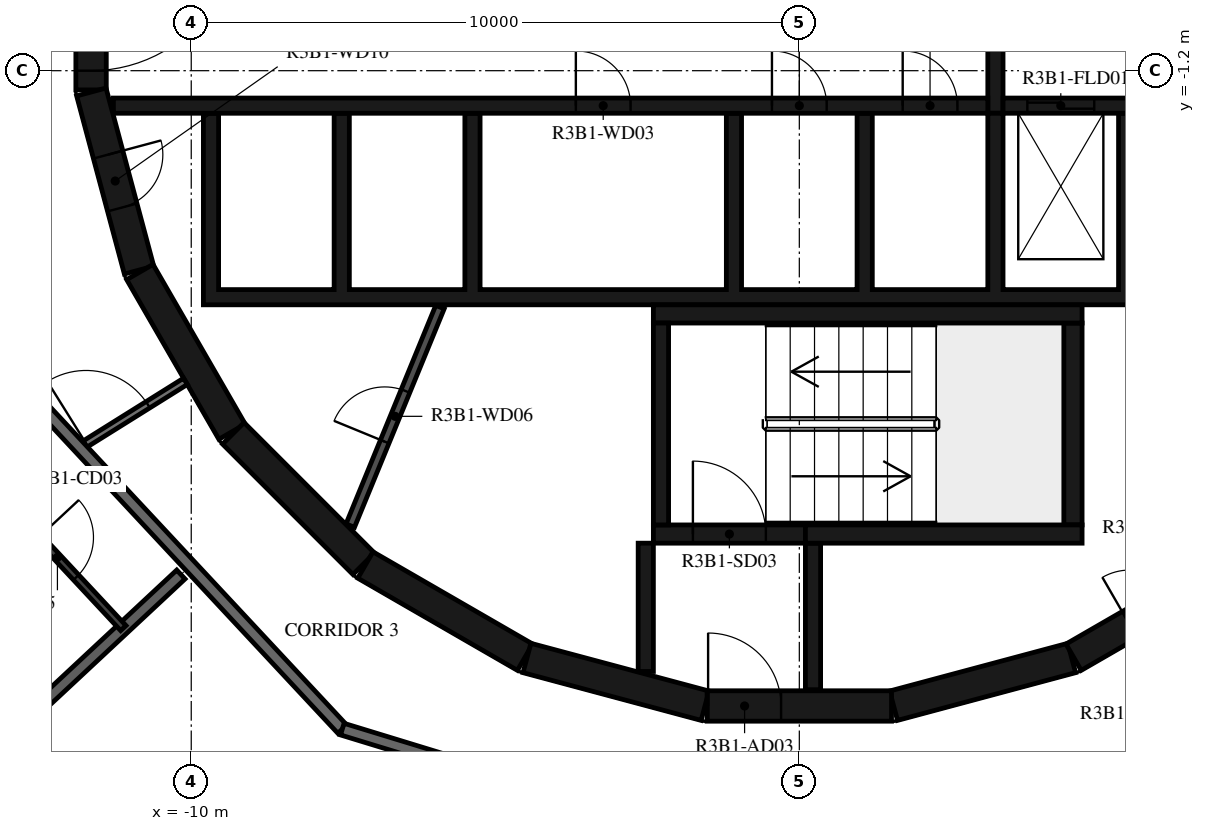
"""IFC4 building model, lengths in metres.
Left out: names, types, materials, properties, quantities, classifications, styles, units other than length and angle.
Written with IfcOpenShell. Run it as: python <this file> out.ifc"""

import sys

from ifc_helpers import new_model, si_unit, direction, frame, frame_2d, origin, place, context, subcontext, project, spatial, polyline, rectangle, outline, extrude, element, fill, save


model = new_model("IFC4")
c1 = context("Model", 3, precision=1e-05, world=origin(), true_north=direction((0.0, 1.0)))
c2 = subcontext(c1, "Body", "Model", "MODEL_VIEW")
j1 = project(units=[si_unit("LENGTHUNIT", "METRE"), si_unit("PLANEANGLEUNIT", "RADIAN")], contexts=[c1])
p1 = place(None, origin())
s1 = spatial("IfcSite", under=j1, at=p1, CompositionType="ELEMENT")
p2 = place(p1, origin())
s2 = spatial("IfcBuilding", under=s1, at=p2, CompositionType="ELEMENT")
p3 = place(p2, frame((0.0, 0.0, 123.9)))
s3 = spatial("IfcBuildingStorey", under=s2, at=p3, CompositionType="ELEMENT", Elevation=123.9)
p4 = place(p3, frame((1.55, -11.643, 0.0), z_axis=(0.0, 0.0, 1.0), x_axis=(0.965948410781, 0.258734743916, 0.0)))
e1 = element("IfcWall", 1, at=p4, inside=s3, PredefinedType="SHEAR", context=c2, shape_type="SweptSolid", body=[
    extrude(rectangle(XDim=3.033, YDim=0.5, at=frame_2d((1.516, 0.0))), origin(), (0.0, 0.0, 1.0), 3.12),
])
p5 = place(p3, frame((4.51, -10.845, 0.0), z_axis=(0.0, 0.0, 1.0), x_axis=(0.865975092491, 0.500087131594, 0.0)))
e2 = element("IfcWall", 2, at=p5, inside=s3, PredefinedType="SHEAR", context=c2, shape_type="SweptSolid", body=[
    extrude(rectangle(XDim=3.033, YDim=0.5, at=frame_2d((1.516, 0.0))), origin(), (0.0, 0.0, 1.0), 3.12),
])
p6 = place(p5, frame((1.066, 0.0, 0.0)))
e3 = element("IfcOpeningElement", 3, at=p6, cuts=e2, PredefinedType="OPENING", context=c2, shape_type="SweptSolid", body=[
    extrude(rectangle(XDim=0.9, YDim=2.1, at=frame_2d((0.45, 1.05))), frame((0.0, 0.26, 0.0), z_axis=(0.0, -1.0, 0.0), x_axis=(1.0, 0.0, 0.0)), (0.0, 0.0, 1.0), 0.52),
])
p7 = place(p3, frame((-11.647, 1.516, 0.0), z_axis=(0.0, 0.0, 1.0), x_axis=(0.0, -1.0, 0.0)))
e4 = element("IfcWall", 4, at=p7, inside=s3, PredefinedType="SHEAR", context=c2, shape_type="SweptSolid", body=[
    extrude(rectangle(XDim=3.033, YDim=0.5, at=frame_2d((1.516, 0.0))), origin(), (0.0, 0.0, 1.0), 3.12),
])
p8 = place(p7, frame((0.316, 0.0, 0.0)))
e5 = element("IfcOpeningElement", 5, at=p8, cuts=e4, PredefinedType="OPENING", context=c2, shape_type="SweptSolid", body=[
    extrude(rectangle(XDim=2.4, YDim=2.1, at=frame_2d((1.2, 1.05))), frame((0.0, 0.26, 0.0), z_axis=(0.0, -1.0, 0.0), x_axis=(1.0, 0.0, 0.0)), (0.0, 0.0, 1.0), 0.52),
])
p9 = place(p3, frame((-11.643, -1.55, 0.0), z_axis=(0.0, 0.0, 1.0), x_axis=(0.258734743916, -0.965948410781, 0.0)))
e6 = element("IfcWall", 6, at=p9, inside=s3, PredefinedType="SHEAR", context=c2, shape_type="SweptSolid", body=[
    extrude(rectangle(XDim=3.033, YDim=0.5, at=frame_2d((1.516, 0.0))), origin(), (0.0, 0.0, 1.0), 3.12),
])
p10 = place(p9, frame((1.066, 0.0, 0.0)))
e7 = element("IfcOpeningElement", 7, at=p10, cuts=e6, PredefinedType="OPENING", context=c2, shape_type="SweptSolid", body=[
    extrude(rectangle(XDim=0.9, YDim=2.1, at=frame_2d((0.45, 1.05))), frame((0.0, 0.26, 0.0), z_axis=(0.0, -1.0, 0.0), x_axis=(1.0, 0.0, 0.0)), (0.0, 0.0, 1.0), 0.52),
])
p11 = place(p3, frame((-10.845, -4.51, 0.0), z_axis=(0.0, 0.0, 1.0), x_axis=(0.500087131594, -0.865975092491, 0.0)))
e8 = element("IfcWall", 8, at=p11, inside=s3, PredefinedType="SHEAR", context=c2, shape_type="SweptSolid", body=[
    extrude(rectangle(XDim=3.033, YDim=0.5, at=frame_2d((1.516, 0.0))), origin(), (0.0, 0.0, 1.0), 3.12),
])
p12 = place(p3, frame((-9.308, -7.164, 0.0), z_axis=(0.0, 0.0, 1.0), x_axis=(0.707106781187, -0.707106781187, 0.0)))
e9 = element("IfcWall", 9, at=p12, inside=s3, PredefinedType="SHEAR", context=c2, shape_type="SweptSolid", body=[
    extrude(rectangle(XDim=3.032, YDim=0.5, at=frame_2d((1.516, 0.0))), origin(), (0.0, 0.0, 1.0), 3.12),
])
for number, where, z_axis, x_axis in (
    (10, (-7.137, -9.329, 0.0), (0.0, 0.0, 1.0), (0.866, -0.5, 0.0)),
    (11, (-4.479, -10.858, 0.0), (0.0, 0.0, 1.0), (0.966, -0.259, 0.0)),
):
    element("IfcWall", number, at=place(p3, frame(where, z_axis=z_axis, x_axis=x_axis)), inside=s3, PredefinedType="SHEAR", context=c2, shape_type="SweptSolid", body=[
        extrude(rectangle(XDim=3.033, YDim=0.5, at=frame_2d((1.516, 0.0))), origin(), (0.0, 0.0, 1.0), 3.12),
    ])
p13 = place(p3, frame((-1.516, -11.647, 0.0), z_axis=(0.0, 0.0, 1.0), x_axis=(1.0, 0.0, 0.0)))
e12 = element("IfcWall", 12, at=p13, inside=s3, PredefinedType="SHEAR", context=c2, shape_type="SweptSolid", body=[
    extrude(rectangle(XDim=3.033, YDim=0.5, at=frame_2d((1.516, 0.0))), origin(), (0.0, 0.0, 1.0), 3.12),
])
p14 = place(p13, frame((0.016, 0.0, 0.0)))
e13 = element("IfcOpeningElement", 13, at=p14, cuts=e12, PredefinedType="OPENING", context=c2, shape_type="SweptSolid", body=[
    extrude(rectangle(XDim=1.2, YDim=2.1, at=frame_2d((0.6, 1.05))), frame((0.0, 0.26, 0.0), z_axis=(0.0, -1.0, 0.0), x_axis=(1.0, 0.0, 0.0)), (0.0, 0.0, 1.0), 0.52),
])
p15 = place(p3, frame((-2.275, -8.67, 0.0), z_axis=(0.0, 0.0, 1.0), x_axis=(0.0, 1.0, 0.0)))
e14 = element("IfcWall", 14, at=p15, inside=s3, PredefinedType="SHEAR", context=c2, shape_type="SweptSolid", body=[
    extrude(rectangle(XDim=3.32, YDim=0.25, at=frame_2d((1.66, 0.0))), origin(), (0.0, 0.0, 1.0), 3.12),
])
p16 = place(p3, frame((-2.4, -5.2, 0.0), z_axis=(0.0, 0.0, 1.0), x_axis=(1.0, 0.0, 0.0)))
e15 = element("IfcWall", 15, at=p16, inside=s3, PredefinedType="SHEAR", context=c2, shape_type="SweptSolid", body=[
    extrude(rectangle(XDim=7.05, YDim=0.3, at=frame_2d((3.525, 0.0))), origin(), (0.0, 0.0, 1.0), 3.12),
])
p17 = place(p3, frame((4.5, -8.67, 0.0), z_axis=(0.0, 0.0, 1.0), x_axis=(0.0, 1.0, 0.0)))
e16 = element("IfcWall", 16, at=p17, inside=s3, PredefinedType="SHEAR", context=c2, shape_type="SweptSolid", body=[
    extrude(rectangle(XDim=3.32, YDim=0.3, at=frame_2d((1.66, 0.0))), origin(), (0.0, 0.0, 1.0), 3.12),
])
p18 = place(p3, frame((0.1, -8.82, 0.0), z_axis=(0.0, 0.0, 1.0), x_axis=(1.0, 0.0, 0.0)))
e17 = element("IfcWall", 17, at=p18, inside=s3, PredefinedType="SHEAR", context=c2, shape_type="SweptSolid", body=[
    extrude(rectangle(XDim=4.55, YDim=0.3, at=frame_2d((2.275, 0.0))), origin(), (0.0, 0.0, 1.0), 3.12),
])
p19 = place(p3, frame((-2.4, -8.82, 0.0), z_axis=(0.0, 0.0, 1.0), x_axis=(1.0, 0.0, 0.0)))
e18 = element("IfcWall", 18, at=p19, inside=s3, PredefinedType="SHEAR", context=c2, shape_type="SweptSolid", body=[
    extrude(rectangle(XDim=2.5, YDim=0.3, at=frame_2d((1.25, 0.0))), origin(), (0.0, 0.0, 1.0), 3.12),
])
p20 = place(p19, frame((0.65, 0.0, 0.0)))
e19 = element("IfcOpeningElement", 19, at=p20, cuts=e18, PredefinedType="OPENING", context=c2, shape_type="SweptSolid", body=[
    extrude(rectangle(XDim=1.2, YDim=2.1, at=frame_2d((0.6, 1.05))), frame((0.0, 0.16, 0.0), z_axis=(0.0, -1.0, 0.0), x_axis=(1.0, 0.0, 0.0)), (0.0, 0.0, 1.0), 0.32),
])
p21 = place(p3, frame((-2.525, -8.97, 0.0), z_axis=(0.0, 0.0, 1.0), x_axis=(0.0, -1.0, 0.0)))
e20 = element("IfcWall", 20, at=p21, inside=s3, PredefinedType="SHEAR", context=c2, shape_type="SweptSolid", body=[
    extrude(rectangle(XDim=2.11, YDim=0.25, at=frame_2d((1.055, 0.0))), origin(), (0.0, 0.0, 1.0), 3.12),
])
p22 = place(p3, frame((0.225, -8.97, 0.0), z_axis=(0.0, 0.0, 1.0), x_axis=(0.0, -1.0, 0.0)))
e21 = element("IfcWall", 21, at=p22, inside=s3, PredefinedType="SHEAR", context=c2, shape_type="SweptSolid", body=[
    extrude(rectangle(XDim=2.41, YDim=0.25, at=frame_2d((1.205, 0.0))), origin(), (0.0, 0.0, 1.0), 3.12),
])
p23 = place(p3, origin())
e22 = element("IfcWall", 22, at=p23, inside=s3, PredefinedType="SHEAR", context=c2, shape_type="SweptSolid", body=[
    extrude(outline(polyline([(9.8, -5.05), (9.8, -4.8), (9.8, -1.9), (9.55, -1.9), (9.55, -4.8), (7.65, -4.8), (7.65, -1.9), (7.4, -1.9), (7.4, -4.8), (5.5, -4.8), (5.5, -1.9), (5.25, -1.9), (5.25, -4.8), (3.35, -4.8), (3.35, -1.9), (3.1, -1.9), (3.1, -4.8), (1.2, -4.8), (1.2, -1.9), (0.95, -1.9), (0.95, -4.8), (-0.95, -4.8), (-0.95, -1.9), (-1.2, -1.9), (-1.2, -4.8), (-5.25, -4.8), (-5.25, -1.9), (-5.5, -1.9), (-5.5, -4.8), (-7.4, -4.8), (-7.4, -1.9), (-7.65, -1.9), (-7.65, -4.8), (-9.55, -4.8), (-9.55, -1.9), (-9.8, -1.9), (-9.8, -4.8), (-9.8, -5.05), (9.8, -5.05)])), origin(), (0.0, 0.0, 1.0), 3.12),
])
p24 = place(p3, frame((-11.28, -1.775, 0.0), z_axis=(0.0, 0.0, 1.0), x_axis=(1.0, 0.0, 0.0)))
e23 = element("IfcWall", 23, at=p24, inside=s3, PredefinedType="SHEAR", context=c2, shape_type="SweptSolid", body=[
    extrude(rectangle(XDim=14.38, YDim=0.25, at=frame_2d((7.19, 0.0))), origin(), (0.0, 0.0, 1.0), 3.12),
])
p25 = place(p24, frame((7.605, 0.0, 0.0)))
e24 = element("IfcOpeningElement", 24, at=p25, cuts=e23, PredefinedType="OPENING", context=c2, shape_type="SweptSolid", body=[
    extrude(rectangle(XDim=0.9, YDim=2.1, at=frame_2d((0.45, 1.05))), frame((0.0, 0.135, 0.0), z_axis=(0.0, -1.0, 0.0), x_axis=(1.0, 0.0, 0.0)), (0.0, 0.0, 1.0), 0.27),
])
p26 = place(p24, frame((10.83, 0.0, 0.0)))
e25 = element("IfcOpeningElement", 25, at=p26, cuts=e23, PredefinedType="OPENING", context=c2, shape_type="SweptSolid", body=[
    extrude(rectangle(XDim=0.9, YDim=2.1, at=frame_2d((0.45, 1.05))), frame((0.0, 0.135, 0.0), z_axis=(0.0, -1.0, 0.0), x_axis=(1.0, 0.0, 0.0)), (0.0, 0.0, 1.0), 0.27),
])
p27 = place(p24, frame((12.98, 0.0, 0.0)))
e26 = element("IfcOpeningElement", 26, at=p27, cuts=e23, PredefinedType="OPENING", context=c2, shape_type="SweptSolid", body=[
    extrude(rectangle(XDim=0.9, YDim=2.1, at=frame_2d((0.45, 1.05))), frame((0.0, 0.135, 0.0), z_axis=(0.0, -1.0, 0.0), x_axis=(1.0, 0.0, 0.0)), (0.0, 0.0, 1.0), 0.27),
])
p28 = place(p3, frame((3.35, -1.775, 0.0), z_axis=(0.0, 0.0, 1.0), x_axis=(1.0, 0.0, 0.0)))
e27 = element("IfcWall", 27, at=p28, inside=s3, PredefinedType="SHEAR", context=c2, shape_type="SweptSolid", body=[
    extrude(rectangle(XDim=7.93, YDim=0.25, at=frame_2d((3.965, 0.0))), origin(), (0.0, 0.0, 1.0), 3.12),
])
p29 = place(p28, frame((0.4, 0.0, 0.0)))
e28 = element("IfcOpeningElement", 28, at=p29, cuts=e27, PredefinedType="OPENING", context=c2, shape_type="SweptSolid", body=[
    extrude(rectangle(XDim=1.1, YDim=2.4, at=frame_2d((0.55, 1.2))), frame((0.0, 0.135, 0.0), z_axis=(0.0, -1.0, 0.0), x_axis=(1.0, 0.0, 0.0)), (0.0, 0.0, 1.0), 0.27),
])
p30 = place(p28, frame((2.55, 0.0, 0.0)))
e29 = element("IfcOpeningElement", 29, at=p30, cuts=e27, PredefinedType="OPENING", context=c2, shape_type="SweptSolid", body=[
    extrude(rectangle(XDim=1.1, YDim=2.4, at=frame_2d((0.55, 1.2))), frame((0.0, 0.135, 0.0), z_axis=(0.0, -1.0, 0.0), x_axis=(1.0, 0.0, 0.0)), (0.0, 0.0, 1.0), 0.27),
])
p31 = place(p28, frame((4.7, 0.0, 0.0)))
e30 = element("IfcOpeningElement", 30, at=p31, cuts=e27, PredefinedType="OPENING", context=c2, shape_type="SweptSolid", body=[
    extrude(rectangle(XDim=1.1, YDim=2.4, at=frame_2d((0.55, 1.2))), frame((0.0, 0.135, 0.0), z_axis=(0.0, -1.0, 0.0), x_axis=(1.0, 0.0, 0.0)), (0.0, 0.0, 1.0), 0.27),
])
p32 = place(p3, frame((3.225, -1.9, 0.0), z_axis=(0.0, 0.0, 1.0), x_axis=(0.0, 1.0, 0.0)))
e31 = element("IfcWall", 31, at=p32, inside=s3, PredefinedType="SHEAR", context=c2, shape_type="SweptSolid", body=[
    extrude(rectangle(XDim=3.8, YDim=0.25, at=frame_2d((1.9, 0.0))), origin(), (0.0, 0.0, 1.0), 3.12),
])
p33 = place(p3, frame((-7.385, -8.681, 0.0), z_axis=(0.0, 0.0, 1.0), x_axis=(0.379804590409, 0.925066739811, 0.0)))
e32 = element("IfcWall", 32, at=p33, inside=s3, PredefinedType="PARTITIONING", context=c2, shape_type="SweptSolid", body=[
    extrude(rectangle(XDim=3.885, YDim=0.15, at=frame_2d((1.942, 0.0))), origin(), (0.0, 0.0, 1.0), 3.12),
])
p34 = place(p33, frame((1.493, 0.0, 0.0)))
e33 = element("IfcOpeningElement", 33, at=p34, cuts=e32, PredefinedType="OPENING", context=c2, shape_type="SweptSolid", body=[
    extrude(rectangle(XDim=0.9, YDim=2.1, at=frame_2d((0.45, 1.05))), frame((0.0, 0.085, 0.0), z_axis=(0.0, -1.0, 0.0), x_axis=(1.0, 0.0, 0.0)), (0.0, 0.0, 1.0), 0.17),
])
p35 = place(p3, frame((-11.836, -7.396, 0.0), z_axis=(0.0, 0.0, 1.0), x_axis=(0.848071831599, 0.529881277692, 0.0)))
e34 = element("IfcWall", 34, at=p35, inside=s3, PredefinedType="PARTITIONING", context=c2, shape_type="SweptSolid", body=[
    extrude(rectangle(XDim=2.052, YDim=0.12, at=frame_2d((1.026, 0.0))), origin(), (0.0, 0.0, 1.0), 3.12),
])
p36 = place(p35, frame((0.125, 0.0, 0.0)))
e35 = element("IfcOpeningElement", 35, at=p36, cuts=e34, PredefinedType="OPENING", context=c2, shape_type="SweptSolid", body=[
    extrude(rectangle(XDim=1.2, YDim=2.1, at=frame_2d((0.6, 1.05))), frame((0.0, 0.07, 0.0), z_axis=(0.0, -1.0, 0.0), x_axis=(1.0, 0.0, 0.0)), (0.0, 0.0, 1.0), 0.14),
])
p37 = place(p3, frame((-12.523, -6.659, 0.0), z_axis=(0.0, 0.0, 1.0), x_axis=(0.682001841105, -0.731350455479, 0.0)))
e36 = element("IfcWall", 36, at=p37, inside=s3, PredefinedType="STANDARD", context=c2, shape_type="SweptSolid", body=[
    extrude(rectangle(XDim=7.342, YDim=0.2, at=frame_2d((3.671, 0.0))), origin(), (0.0, 0.0, 1.0), 3.12),
])
p38 = place(p3, frame((-7.516, -12.028, 0.0), z_axis=(0.0, 0.0, 1.0), x_axis=(0.956306642771, -0.292365533182, 0.0)))
e37 = element("IfcWall", 37, at=p38, inside=s3, PredefinedType="STANDARD", context=c2, shape_type="SweptSolid", body=[
    extrude(rectangle(XDim=7.342, YDim=0.2, at=frame_2d((3.671, 0.0))), origin(), (0.0, 0.0, 1.0), 3.12),
])
p39 = place(p38, frame((6.142, 0.0, 0.0)))
e38 = element("IfcOpeningElement", 38, at=p39, cuts=e37, PredefinedType="OPENING", context=c2, shape_type="SweptSolid", body=[
    extrude(rectangle(XDim=1.0, YDim=2.1, at=frame_2d((0.5, 1.05))), frame((0.0, 0.11, 0.0), z_axis=(0.0, -1.0, 0.0), x_axis=(1.0, 0.0, 0.0)), (0.0, 0.0, 1.0), 0.22),
])
p40 = place(p3, frame((-14.479, -13.504, 0.0), z_axis=(0.0, 0.0, 1.0), x_axis=(0.731329393611, 0.682024426278, 0.0)))
e39 = element("IfcWall", 39, at=p40, inside=s3, PredefinedType="STANDARD", context=c2, shape_type="SweptSolid", body=[
    extrude(rectangle(XDim=5.892, YDim=0.2, at=frame_2d((2.946, 0.0))), origin(), (0.0, 0.0, 1.0), 3.12),
])
p41 = place(p3, frame((-13.894, -7.388, 0.0), z_axis=(0.0, 0.0, 1.0), x_axis=(0.681978591143, -0.731372135935, 0.0)))
e40 = element("IfcWall", 40, at=p41, inside=s3, PredefinedType="PARTITIONING", context=c2, shape_type="SweptSolid", body=[
    extrude(rectangle(XDim=4.073, YDim=0.12, at=frame_2d((2.036, 0.0))), origin(), (0.0, 0.0, 1.0), 3.12),
])
p42 = place(p41, frame((2.033, 0.0, 0.0)))
e41 = element("IfcOpeningElement", 41, at=p42, cuts=e40, PredefinedType="OPENING", context=c2, shape_type="SweptSolid", body=[
    extrude(rectangle(XDim=0.9, YDim=2.1, at=frame_2d((0.45, 1.05))), frame((0.0, 0.07, 0.0), z_axis=(0.0, -1.0, 0.0), x_axis=(1.0, 0.0, 0.0)), (0.0, 0.0, 1.0), 0.14),
])
p43 = place(p3, frame((-13.939, -18.911, 0.0), z_axis=(0.0, 0.0, 1.0), x_axis=(0.974369607456, 0.224953035245, 0.0)))
e42 = element("IfcWall", 42, at=p43, inside=s3, PredefinedType="PARTITIONING", context=c2, shape_type="SweptSolid", body=[
    extrude(rectangle(XDim=33.934, YDim=0.12, at=frame_2d((16.967, 0.0))), origin(), (0.0, 0.0, 1.0), 3.12),
])
p44 = place(p43, frame((2.0, 0.0, 0.0)))
e43 = element("IfcOpeningElement", 43, at=p44, cuts=e42, PredefinedType="OPENING", context=c2, shape_type="SweptSolid", body=[
    extrude(rectangle(XDim=0.9, YDim=2.1, at=frame_2d((0.45, 1.05))), frame((0.0, 0.07, 0.0), z_axis=(0.0, -1.0, 0.0), x_axis=(1.0, 0.0, 0.0)), (0.0, 0.0, 1.0), 0.14),
])
p45 = place(p43, frame((28.154, 0.0, 0.0)))
e44 = element("IfcOpeningElement", 44, at=p45, cuts=e42, PredefinedType="OPENING", context=c2, shape_type="SweptSolid", body=[
    extrude(rectangle(XDim=0.9, YDim=2.1, at=frame_2d((0.45, 1.05))), frame((0.0, 0.07, 0.0), z_axis=(0.0, -1.0, 0.0), x_axis=(1.0, 0.0, 0.0)), (0.0, 0.0, 1.0), 0.14),
])
p46 = place(p43, frame((30.039, 0.0, 0.0)))
e45 = element("IfcOpeningElement", 45, at=p46, cuts=e42, PredefinedType="OPENING", context=c2, shape_type="SweptSolid", body=[
    extrude(rectangle(XDim=0.9, YDim=2.1, at=frame_2d((0.45, 1.05))), frame((0.0, 0.07, 0.0), z_axis=(0.0, -1.0, 0.0), x_axis=(1.0, 0.0, 0.0)), (0.0, 0.0, 1.0), 0.14),
])
p47 = place(p20, origin())
e46 = element("IfcDoor", 46, at=p47, inside=s3, OperationType="SINGLE_SWING_LEFT", PredefinedType="DOOR", context=c2, shape_type="SweptSolid", body=[
    extrude(rectangle(XDim=1.2, YDim=2.1, at=frame_2d((0.6, 1.05))), frame((0.0, 0.025, 0.0), z_axis=(0.0, -1.0, 0.0), x_axis=(1.0, 0.0, 0.0)), (0.0, 0.0, 1.0), 0.05),
])
fill(e19, e46)
p48 = place(p14, origin())
e47 = element("IfcDoor", 47, at=p48, inside=s3, OperationType="SINGLE_SWING_RIGHT", PredefinedType="DOOR", context=c2, shape_type="SweptSolid", body=[
    extrude(rectangle(XDim=1.2, YDim=2.1, at=frame_2d((0.6, 1.05))), frame((0.0, 0.025, 0.0), z_axis=(0.0, -1.0, 0.0), x_axis=(1.0, 0.0, 0.0)), (0.0, 0.0, 1.0), 0.05),
])
fill(e13, e47)
p49 = place(p8, origin())
e48 = element("IfcDoor", 48, at=p49, inside=s3, OperationType="DOUBLE_DOOR_SINGLE_SWING", PredefinedType="DOOR", context=c2, shape_type="SweptSolid", body=[
    extrude(rectangle(XDim=2.4, YDim=2.1, at=frame_2d((1.2, 1.05))), frame((0.0, 0.025, 0.0), z_axis=(0.0, -1.0, 0.0), x_axis=(1.0, 0.0, 0.0)), (0.0, 0.0, 1.0), 0.05),
])
fill(e5, e48)
p50 = place(p29, origin())
e49 = element("IfcDoor", 49, at=p50, inside=s3, OperationType="DOUBLE_DOOR_SLIDING", PredefinedType="DOOR", context=c2, shape_type="SweptSolid", body=[
    extrude(rectangle(XDim=1.1, YDim=2.4, at=frame_2d((0.55, 1.2))), frame((0.0, 0.025, 0.0), z_axis=(0.0, -1.0, 0.0), x_axis=(1.0, 0.0, 0.0)), (0.0, 0.0, 1.0), 0.05),
])
fill(e28, e49)
p51 = place(p25, origin())
e50 = element("IfcDoor", 50, at=p51, inside=s3, OperationType="SINGLE_SWING_RIGHT", PredefinedType="DOOR", context=c2, shape_type="SweptSolid", body=[
    extrude(rectangle(XDim=0.9, YDim=2.1, at=frame_2d((0.45, 1.05))), frame((0.0, 0.025, 0.0), z_axis=(0.0, -1.0, 0.0), x_axis=(1.0, 0.0, 0.0)), (0.0, 0.0, 1.0), 0.05),
])
fill(e24, e50)
p52 = place(p26, origin())
e51 = element("IfcDoor", 51, at=p52, inside=s3, OperationType="SINGLE_SWING_LEFT", PredefinedType="DOOR", context=c2, shape_type="SweptSolid", body=[
    extrude(rectangle(XDim=0.9, YDim=2.1, at=frame_2d((0.45, 1.05))), frame((0.0, 0.025, 0.0), z_axis=(0.0, -1.0, 0.0), x_axis=(1.0, 0.0, 0.0)), (0.0, 0.0, 1.0), 0.05),
])
fill(e25, e51)
p53 = place(p27, origin())
e52 = element("IfcDoor", 52, at=p53, inside=s3, OperationType="SINGLE_SWING_RIGHT", PredefinedType="DOOR", context=c2, shape_type="SweptSolid", body=[
    extrude(rectangle(XDim=0.9, YDim=2.1, at=frame_2d((0.45, 1.05))), frame((0.0, 0.025, 0.0), z_axis=(0.0, -1.0, 0.0), x_axis=(1.0, 0.0, 0.0)), (0.0, 0.0, 1.0), 0.05),
])
fill(e26, e52)
p54 = place(p34, origin())
e53 = element("IfcDoor", 53, at=p54, inside=s3, OperationType="SINGLE_SWING_LEFT", PredefinedType="DOOR", context=c2, shape_type="SweptSolid", body=[
    extrude(rectangle(XDim=0.9, YDim=2.1, at=frame_2d((0.45, 1.05))), frame((0.0, 0.025, 0.0), z_axis=(0.0, -1.0, 0.0), x_axis=(1.0, 0.0, 0.0)), (0.0, 0.0, 1.0), 0.05),
])
fill(e33, e53)
p55 = place(p10, origin())
e54 = element("IfcDoor", 54, at=p55, inside=s3, OperationType="SINGLE_SWING_LEFT", PredefinedType="DOOR", context=c2, shape_type="SweptSolid", body=[
    extrude(rectangle(XDim=0.9, YDim=2.1, at=frame_2d((0.45, 1.05))), frame((0.0, 0.025, 0.0), z_axis=(0.0, -1.0, 0.0), x_axis=(1.0, 0.0, 0.0)), (0.0, 0.0, 1.0), 0.05),
])
fill(e7, e54)
p56 = place(p42, origin())
e55 = element("IfcDoor", 55, at=p56, inside=s3, OperationType="SINGLE_SWING_RIGHT", PredefinedType="DOOR", context=c2, shape_type="SweptSolid", body=[
    extrude(rectangle(XDim=0.9, YDim=2.1, at=frame_2d((0.45, 1.05))), frame((0.0, 0.025, 0.0), z_axis=(0.0, -1.0, 0.0), x_axis=(1.0, 0.0, 0.0)), (0.0, 0.0, 1.0), 0.05),
])
fill(e41, e55)
p57 = place(p36, origin())
e56 = element("IfcDoor", 56, at=p57, inside=s3, OperationType="DOUBLE_DOOR_SINGLE_SWING", PredefinedType="DOOR", context=c2, shape_type="SweptSolid", body=[
    extrude(rectangle(XDim=1.2, YDim=2.1, at=frame_2d((0.6, 1.05))), frame((0.0, 0.025, 0.0), z_axis=(0.0, -1.0, 0.0), x_axis=(1.0, 0.0, 0.0)), (0.0, 0.0, 1.0), 0.05),
])
fill(e35, e56)
save(model, sys.argv[1])
